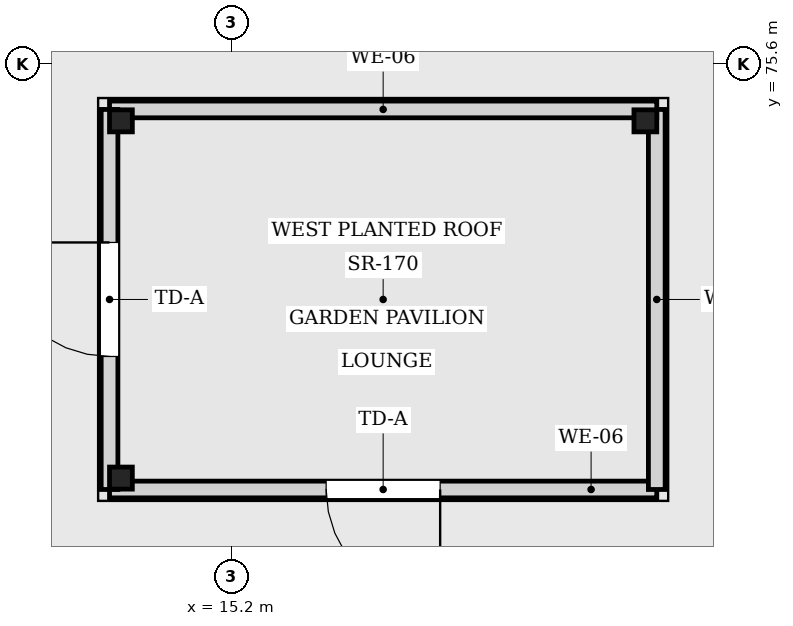
"""IFC4 building model, lengths in metres.
Left out: names, types, materials, properties, quantities, classifications, styles, units other than length and angle.
Written with IfcOpenShell. Run it as: python <this file> out.ifc"""

import sys

from ifc_helpers import new_model, si_unit, direction, frame, frame_2d, origin, origin_2d, place, context, subcontext, project, spatial, rectangle, i_section, extrude, element, fill, save


model = new_model("IFC4")
c1 = context("Model", 3, precision=1e-05, world=origin(), true_north=direction((0.0, 1.0)))
c2 = subcontext(c1, "Body", "Model", "MODEL_VIEW")
j1 = project(units=[si_unit("LENGTHUNIT", "METRE"), si_unit("PLANEANGLEUNIT", "RADIAN")], contexts=[c1])
p1 = place(None, origin())
s1 = spatial("IfcSite", under=j1, at=p1, CompositionType="ELEMENT")
p2 = place(p1, origin())
s2 = spatial("IfcBuilding", under=s1, at=p2, CompositionType="ELEMENT")
p3 = place(p2, frame((0.0, 0.0, 21.3)))
s3 = spatial("IfcBuildingStorey", under=s2, at=p3, CompositionType="ELEMENT", Elevation=21.3)
p4 = place(p3, frame((13.75, 70.15, 0.0), z_axis=(0.0, 0.0, 1.0), x_axis=(1.0, 0.0, 0.0)))
e1 = element("IfcColumn", 1, at=p4, inside=s3, PredefinedType="COLUMN", context=c2, shape_type="SweptSolid", body=[
    extrude(i_section(OverallWidth=0.3, OverallDepth=0.29, WebThickness=0.009, FlangeThickness=0.014, at=origin_2d()), origin(), (0.0, 0.0, 1.0), 3.0),
])
p5 = place(p3, frame((20.65, 74.85, 0.0), z_axis=(0.0, 0.0, 1.0), x_axis=(1.0, 0.0, 0.0)))
e2 = element("IfcColumn", 2, at=p5, inside=s3, PredefinedType="COLUMN", context=c2, shape_type="SweptSolid", body=[
    extrude(i_section(OverallWidth=0.3, OverallDepth=0.29, WebThickness=0.009, FlangeThickness=0.014, at=origin_2d()), origin(), (0.0, 0.0, 1.0), 4.862),
])
p6 = place(p3, frame((13.75, 74.85, 0.0), z_axis=(0.0, 0.0, 1.0), x_axis=(1.0, 0.0, 0.0)))
e3 = element("IfcColumn", 3, at=p6, inside=s3, PredefinedType="COLUMN", context=c2, shape_type="SweptSolid", body=[
    extrude(i_section(OverallWidth=0.3, OverallDepth=0.29, WebThickness=0.009, FlangeThickness=0.014, at=origin_2d()), origin(), (0.0, 0.0, 1.0), 3.0),
])
p7 = place(p3, frame((20.8, 70.0, 0.0), z_axis=(0.0, 0.0, 1.0), x_axis=(-1.0, 0.0, 0.0)))
e4 = element("IfcWall", 4, at=p7, inside=s3, PredefinedType="STANDARD", context=c2, shape_type="SweptSolid", body=[
    extrude(rectangle(XDim=7.2, YDim=0.22, at=frame_2d((3.6, 0.0))), origin(), (0.0, 0.0, 1.0), 3.931),
])
p8 = place(p7, frame((2.85, 0.0, 0.0)))
e5 = element("IfcOpeningElement", 5, at=p8, cuts=e4, PredefinedType="OPENING", context=c2, shape_type="SweptSolid", body=[
    extrude(rectangle(XDim=1.5, YDim=2.2, at=frame_2d((0.75, 1.1))), frame((0.0, 0.12, 0.0), z_axis=(0.0, -1.0, 0.0), x_axis=(1.0, 0.0, 0.0)), (0.0, 0.0, 1.0), 0.24),
])
p9 = place(p3, frame((20.8, 75.0, 0.0), z_axis=(0.0, 0.0, 1.0), x_axis=(0.0, -1.0, 0.0)))
e6 = element("IfcWall", 6, at=p9, inside=s3, PredefinedType="STANDARD", context=c2, shape_type="SweptSolid", body=[
    extrude(rectangle(XDim=5.0, YDim=0.22, at=frame_2d((2.5, 0.0))), origin(), (0.0, 0.0, 1.0), 4.682),
])
p10 = place(p3, frame((13.6, 75.0, 0.0), z_axis=(0.0, 0.0, 1.0), x_axis=(1.0, 0.0, 0.0)))
e7 = element("IfcWall", 7, at=p10, inside=s3, PredefinedType="STANDARD", context=c2, shape_type="SweptSolid", body=[
    extrude(rectangle(XDim=7.2, YDim=0.22, at=frame_2d((3.6, 0.0))), origin(), (0.0, 0.0, 1.0), 3.0),
])
p11 = place(p3, frame((13.6, 70.0, 0.0), z_axis=(0.0, 0.0, 1.0), x_axis=(0.0, 1.0, 0.0)))
e8 = element("IfcWall", 8, at=p11, inside=s3, PredefinedType="STANDARD", context=c2, shape_type="SweptSolid", body=[
    extrude(rectangle(XDim=5.0, YDim=0.22, at=frame_2d((2.5, 0.0))), origin(), (0.0, 0.0, 1.0), 3.0),
])
p12 = place(p11, frame((1.75, 0.0, 0.0)))
e9 = element("IfcOpeningElement", 9, at=p12, cuts=e8, PredefinedType="OPENING", context=c2, shape_type="SweptSolid", body=[
    extrude(rectangle(XDim=1.5, YDim=2.2, at=frame_2d((0.75, 1.1))), frame((0.0, 0.12, 0.0), z_axis=(0.0, -1.0, 0.0), x_axis=(1.0, 0.0, 0.0)), (0.0, 0.0, 1.0), 0.24),
])
p13 = place(p8, origin())
e10 = element("IfcDoor", 10, at=p13, inside=s3, OperationType="SINGLE_SWING_LEFT", PredefinedType="DOOR", context=c2, shape_type="SweptSolid", body=[
    extrude(rectangle(XDim=1.5, YDim=2.2, at=frame_2d((0.75, 1.1))), frame((0.0, 0.025, 0.0), z_axis=(0.0, -1.0, 0.0), x_axis=(1.0, 0.0, 0.0)), (0.0, 0.0, 1.0), 0.05),
])
fill(e5, e10)
p14 = place(p12, origin())
e11 = element("IfcDoor", 11, at=p14, inside=s3, OperationType="SINGLE_SWING_RIGHT", PredefinedType="DOOR", context=c2, shape_type="SweptSolid", body=[
    extrude(rectangle(XDim=1.5, YDim=2.2, at=frame_2d((0.75, 1.1))), frame((0.0, 0.025, 0.0), z_axis=(0.0, -1.0, 0.0), x_axis=(1.0, 0.0, 0.0)), (0.0, 0.0, 1.0), 0.05),
])
fill(e9, e11)
save(model, sys.argv[1])
